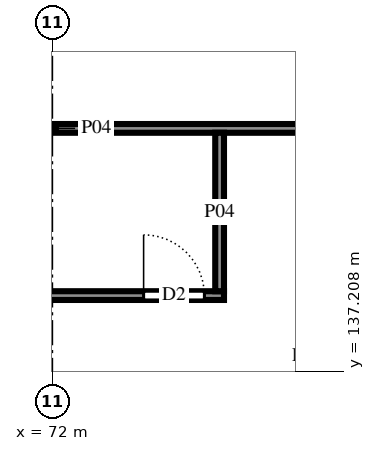
"""IFC4 building model, lengths in metres.
Left out: names, types, materials, properties, quantities, classifications, styles, units other than length and angle.
Written with IfcOpenShell. Run it as: python <this file> out.ifc"""

import sys

from ifc_helpers import new_model, si_unit, direction, frame, frame_2d, origin, place, context, subcontext, project, spatial, rectangle, extrude, element, fill, save


model = new_model("IFC4")
c1 = context("Model", 3, precision=1e-05, world=origin(), true_north=direction((0.0, 1.0)))
c2 = subcontext(c1, "Body", "Model", "MODEL_VIEW")
j1 = project(units=[si_unit("LENGTHUNIT", "METRE"), si_unit("PLANEANGLEUNIT", "RADIAN")], contexts=[c1])
p1 = place(None, origin())
s1 = spatial("IfcSite", under=j1, at=p1, CompositionType="ELEMENT")
p2 = place(p1, origin())
s2 = spatial("IfcBuilding", under=s1, at=p2, CompositionType="ELEMENT")
p3 = place(p2, origin())
s3 = spatial("IfcBuildingStorey", under=s2, at=p3, CompositionType="ELEMENT", Elevation=0.0)
p4 = place(p3, frame((68.4, 138.2, 0.0), z_axis=(0.0, 0.0, 1.0), x_axis=(1.0, 0.0, 0.0)))
e1 = element("IfcWall", 1, at=p4, inside=s3, PredefinedType="PARTITIONING", context=c2, shape_type="SweptSolid", body=[
    extrude(rectangle(XDim=5.858, YDim=0.115, at=frame_2d((2.929, 0.0))), origin(), (0.0, 0.0, 1.0), 3.42),
])
p5 = place(p4, frame((0.6, 0.0, 0.0)))
e2 = element("IfcOpeningElement", 2, at=p5, cuts=e1, PredefinedType="OPENING", context=c2, shape_type="SweptSolid", body=[
    extrude(rectangle(XDim=1.0, YDim=2.1, at=frame_2d((0.5, 1.05))), frame((0.0, 0.067, 0.0), z_axis=(0.0, -1.0, 0.0), x_axis=(1.0, 0.0, 0.0)), (0.0, 0.0, 1.0), 0.135),
])
p6 = place(p4, frame((2.4, 0.0, 0.0)))
e3 = element("IfcOpeningElement", 3, at=p6, cuts=e1, PredefinedType="OPENING", context=c2, shape_type="SweptSolid", body=[
    extrude(rectangle(XDim=0.8, YDim=2.1, at=frame_2d((0.4, 1.05))), frame((0.0, 0.067, 0.0), z_axis=(0.0, -1.0, 0.0), x_axis=(1.0, 0.0, 0.0)), (0.0, 0.0, 1.0), 0.135),
])
p7 = place(p4, frame((3.6, 0.0, 0.0)))
e4 = element("IfcOpeningElement", 4, at=p7, cuts=e1, PredefinedType="OPENING", context=c2, shape_type="SweptSolid", body=[
    extrude(rectangle(XDim=0.8, YDim=2.1, at=frame_2d((0.4, 1.05))), frame((0.0, 0.067, 0.0), z_axis=(0.0, -1.0, 0.0), x_axis=(1.0, 0.0, 0.0)), (0.0, 0.0, 1.0), 0.135),
])
p8 = place(p4, frame((4.8, 0.0, 0.0)))
e5 = element("IfcOpeningElement", 5, at=p8, cuts=e1, PredefinedType="OPENING", context=c2, shape_type="SweptSolid", body=[
    extrude(rectangle(XDim=0.8, YDim=2.1, at=frame_2d((0.4, 1.05))), frame((0.0, 0.067, 0.0), z_axis=(0.0, -1.0, 0.0), x_axis=(1.0, 0.0, 0.0)), (0.0, 0.0, 1.0), 0.135),
])
p9 = place(p3, frame((68.4, 140.4, 0.0), z_axis=(0.0, 0.0, 1.0), x_axis=(1.0, 0.0, 0.0)))
e6 = element("IfcWall", 6, at=p9, inside=s3, PredefinedType="PARTITIONING", context=c2, shape_type="SweptSolid", body=[
    extrude(rectangle(XDim=7.258, YDim=0.115, at=frame_2d((3.629, 0.0))), origin(), (0.0, 0.0, 1.0), 3.42),
])
for number, where, z_axis, x_axis in (
    (7, (73.0, 138.258, 0.0), (0.0, 0.0, 1.0), (0.0, 1.0, 0.0)),
    (8, (74.2, 138.258, 0.0), (0.0, 0.0, 1.0), (0.0, 1.0, 0.0)),
):
    element("IfcWall", number, at=place(p3, frame(where, z_axis=z_axis, x_axis=x_axis)), inside=s3, PredefinedType="PARTITIONING", context=c2, shape_type="SweptSolid", body=[
        extrude(rectangle(XDim=2.085, YDim=0.115, at=frame_2d((1.042, 0.0))), origin(), (0.0, 0.0, 1.0), 3.42),
    ])
p10 = place(p7, origin())
e9 = element("IfcDoor", 9, at=p10, inside=s3, OperationType="SINGLE_SWING_LEFT", PredefinedType="DOOR", context=c2, shape_type="SweptSolid", body=[
    extrude(rectangle(XDim=0.8, YDim=2.1, at=frame_2d((0.4, 1.05))), frame((0.0, 0.025, 0.0), z_axis=(0.0, -1.0, 0.0), x_axis=(1.0, 0.0, 0.0)), (0.0, 0.0, 1.0), 0.05),
])
fill(e4, e9)
p11 = place(p8, origin())
e10 = element("IfcDoor", 10, at=p11, inside=s3, OperationType="SINGLE_SWING_RIGHT", PredefinedType="DOOR", context=c2, shape_type="SweptSolid", body=[
    extrude(rectangle(XDim=0.8, YDim=2.1, at=frame_2d((0.4, 1.05))), frame((0.0, 0.025, 0.0), z_axis=(0.0, -1.0, 0.0), x_axis=(1.0, 0.0, 0.0)), (0.0, 0.0, 1.0), 0.05),
])
fill(e5, e10)
save(model, sys.argv[1])
